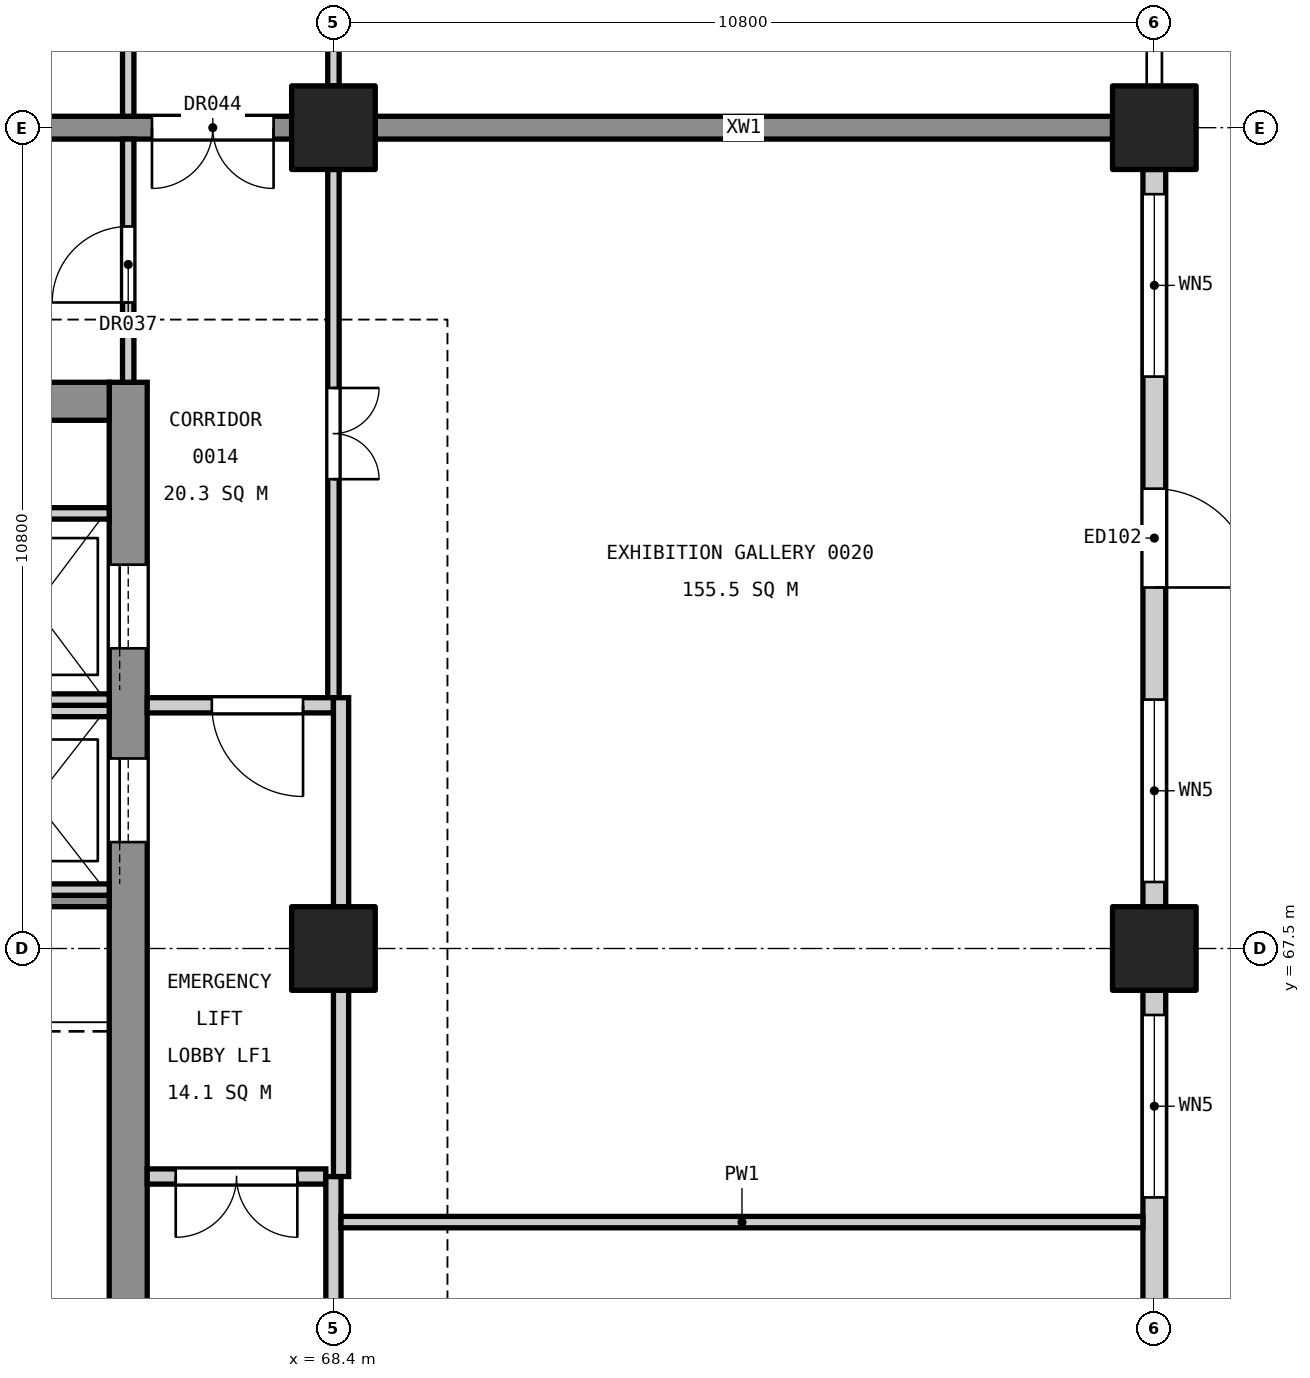
"""IFC4 building model, lengths in metres.
Left out: names, types, materials, properties, quantities, classifications, styles, units other than length and angle.
Written with IfcOpenShell. Run it as: python <this file> out.ifc"""

import sys

from ifc_helpers import new_model, si_unit, direction, frame, frame_2d, origin, origin_2d, place, context, subcontext, project, spatial, rectangle, extrude, element, fill, save


model = new_model("IFC4")
c1 = context("Model", 3, precision=1e-05, world=origin(), true_north=direction((0.0, 1.0)))
c2 = subcontext(c1, "Body", "Model", "MODEL_VIEW")
j1 = project(units=[si_unit("LENGTHUNIT", "METRE"), si_unit("PLANEANGLEUNIT", "RADIAN")], contexts=[c1])
p1 = place(None, origin())
s1 = spatial("IfcSite", under=j1, at=p1, CompositionType="ELEMENT")
p2 = place(p1, origin())
s2 = spatial("IfcBuilding", under=s1, at=p2, CompositionType="ELEMENT")
p3 = place(p2, origin())
s3 = spatial("IfcBuildingStorey", under=s2, at=p3, CompositionType="ELEMENT", Elevation=0.0)
for number, where, z_axis, x_axis in (
    (1, (68.4, 67.5, 0.0), (0.0, 0.0, 1.0), (1.0, 0.0, 0.0)),
    (2, (68.4, 78.3, 0.0), (0.0, 0.0, 1.0), (1.0, 0.0, 0.0)),
    (3, (79.2, 67.5, 0.0), (0.0, 0.0, 1.0), (1.0, 0.0, 0.0)),
    (4, (79.2, 78.3, 0.0), (0.0, 0.0, 1.0), (1.0, 0.0, 0.0)),
):
    element("IfcColumn", number, at=place(p3, frame(where, z_axis=z_axis, x_axis=x_axis)), inside=s3, PredefinedType="COLUMN", context=c2, shape_type="SweptSolid", body=[
        extrude(rectangle(XDim=1.1, YDim=1.1, at=origin_2d()), origin(), (0.0, 0.0, 1.0), 6.0),
    ])
p4 = place(p3, frame((65.7, 60.05, 0.0), z_axis=(0.0, 0.0, 1.0), x_axis=(0.0, 1.0, 0.0)))
e5 = element("IfcWall", 5, at=p4, inside=s3, PredefinedType="SHEAR", context=c2, shape_type="SweptSolid", body=[
    extrude(rectangle(XDim=14.9, YDim=0.5, at=frame_2d((7.45, 0.0))), origin(), (0.0, 0.0, 1.0), 5.7),
])
p5 = place(p4, frame((0.55, 0.0, 0.0)))
e6 = element("IfcOpeningElement", 6, at=p5, cuts=e5, PredefinedType="OPENING", context=c2, shape_type="SweptSolid", body=[
    extrude(rectangle(XDim=1.4, YDim=2.1, at=frame_2d((0.7, 1.05))), frame((0.0, 0.26, 0.0), z_axis=(0.0, -1.0, 0.0), x_axis=(1.0, 0.0, 0.0)), (0.0, 0.0, 1.0), 0.52),
])
p6 = place(p4, frame((8.85, 0.0, 0.0)))
e7 = element("IfcOpeningElement", 7, at=p6, cuts=e5, PredefinedType="OPENING", context=c2, shape_type="SweptSolid", body=[
    extrude(rectangle(XDim=1.1, YDim=2.1, at=frame_2d((0.55, 1.05))), frame((0.0, 0.26, 0.0), z_axis=(0.0, -1.0, 0.0), x_axis=(1.0, 0.0, 0.0)), (0.0, 0.0, 1.0), 0.52),
])
p7 = place(p4, frame((11.4, 0.0, 0.0)))
e8 = element("IfcOpeningElement", 8, at=p7, cuts=e5, PredefinedType="OPENING", context=c2, shape_type="SweptSolid", body=[
    extrude(rectangle(XDim=1.1, YDim=2.1, at=frame_2d((0.55, 1.05))), frame((0.0, 0.26, 0.0), z_axis=(0.0, -1.0, 0.0), x_axis=(1.0, 0.0, 0.0)), (0.0, 0.0, 1.0), 0.52),
])
p8 = place(p3, frame((61.45, 74.7, 0.0), z_axis=(0.0, 0.0, 1.0), x_axis=(1.0, 0.0, 0.0)))
e9 = element("IfcWall", 9, at=p8, inside=s3, PredefinedType="SHEAR", context=c2, shape_type="SweptSolid", body=[
    extrude(rectangle(XDim=4.0, YDim=0.5, at=frame_2d((2.0, 0.0))), origin(), (0.0, 0.0, 1.0), 5.7),
])
p9 = place(p3, frame((61.75, 78.3, 0.0), z_axis=(0.0, 0.0, 1.0), x_axis=(1.0, 0.0, 0.0)))
e10 = element("IfcWall", 10, at=p9, inside=s3, PredefinedType="SHEAR", context=c2, shape_type="SweptSolid", body=[
    extrude(rectangle(XDim=6.1, YDim=0.3, at=frame_2d((3.05, 0.0))), origin(), (0.0, 0.0, 1.0), 5.7),
])
p10 = place(p9, frame((4.262, 0.0, 0.0)))
e11 = element("IfcOpeningElement", 11, at=p10, cuts=e10, PredefinedType="OPENING", context=c2, shape_type="SweptSolid", body=[
    extrude(rectangle(XDim=1.6, YDim=2.1, at=frame_2d((0.8, 1.05))), frame((0.0, 0.16, 0.0), z_axis=(0.0, -1.0, 0.0), x_axis=(1.0, 0.0, 0.0)), (0.0, 0.0, 1.0), 0.32),
])
p11 = place(p3, frame((68.95, 78.3, 0.0), z_axis=(0.0, 0.0, 1.0), x_axis=(1.0, 0.0, 0.0)))
e12 = element("IfcWall", 12, at=p11, inside=s3, PredefinedType="SHEAR", context=c2, shape_type="SweptSolid", body=[
    extrude(rectangle(XDim=9.7, YDim=0.3, at=frame_2d((4.85, 0.0))), origin(), (0.0, 0.0, 1.0), 5.7),
])
p12 = place(p3, frame((61.45, 68.125, 0.0), z_axis=(0.0, 0.0, 1.0), x_axis=(1.0, 0.0, 0.0)))
e13 = element("IfcWall", 13, at=p12, inside=s3, PredefinedType="SOLIDWALL", context=c2, shape_type="SweptSolid", body=[
    extrude(rectangle(XDim=4.0, YDim=0.15, at=frame_2d((2.0, 0.0))), origin(), (0.0, 0.0, 1.0), 5.7),
])
for number, where, z_axis, x_axis in (
    (14, (63.65, 68.275, 0.0), (0.0, 0.0, 1.0), (1.0, 0.0, 0.0)),
    (15, (63.65, 70.625, 0.0), (0.0, 0.0, 1.0), (1.0, 0.0, 0.0)),
    (16, (63.65, 70.775, 0.0), (0.0, 0.0, 1.0), (1.0, 0.0, 0.0)),
    (17, (63.65, 73.225, 0.0), (0.0, 0.0, 1.0), (1.0, 0.0, 0.0)),
):
    element("IfcWall", number, at=place(p3, frame(where, z_axis=z_axis, x_axis=x_axis)), inside=s3, PredefinedType="SOLIDWALL", context=c2, shape_type="SweptSolid", body=[
        extrude(rectangle(XDim=1.8, YDim=0.15, at=frame_2d((0.9, 0.0))), origin(), (0.0, 0.0, 1.0), 6.0),
    ])
p13 = place(p3, frame((79.2, 57.25, 0.0), z_axis=(0.0, 0.0, 1.0), x_axis=(0.0, 1.0, 0.0)))
e18 = element("IfcWall", 18, at=p13, inside=s3, PredefinedType="STANDARD", context=c2, shape_type="SweptSolid", body=[
    extrude(rectangle(XDim=9.7, YDim=0.3, at=frame_2d((4.85, 0.0))), origin(), (0.0, 0.0, 1.0), 4.6),
])
p14 = place(p13, frame((0.325, 0.0, 0.9)))
e19 = element("IfcOpeningElement", 19, at=p14, cuts=e18, PredefinedType="OPENING", context=c2, shape_type="SweptSolid", body=[
    extrude(rectangle(XDim=2.4, YDim=3.0, at=frame_2d((1.2, 1.5))), frame((0.0, 0.16, 0.0), z_axis=(0.0, -1.0, 0.0), x_axis=(1.0, 0.0, 0.0)), (0.0, 0.0, 1.0), 0.32),
])
p15 = place(p13, frame((6.975, 0.0, 0.9)))
e20 = element("IfcOpeningElement", 20, at=p15, cuts=e18, PredefinedType="OPENING", context=c2, shape_type="SweptSolid", body=[
    extrude(rectangle(XDim=2.4, YDim=3.0, at=frame_2d((1.2, 1.5))), frame((0.0, 0.16, 0.0), z_axis=(0.0, -1.0, 0.0), x_axis=(1.0, 0.0, 0.0)), (0.0, 0.0, 1.0), 0.32),
])
p16 = place(p13, frame((4.2, 0.0, 0.0)))
e21 = element("IfcOpeningElement", 21, at=p16, cuts=e18, PredefinedType="OPENING", context=c2, shape_type="SweptSolid", body=[
    extrude(rectangle(XDim=1.3, YDim=2.4, at=frame_2d((0.65, 1.2))), frame((0.0, 0.16, 0.0), z_axis=(0.0, -1.0, 0.0), x_axis=(1.0, 0.0, 0.0)), (0.0, 0.0, 1.0), 0.32),
])
p17 = place(p3, frame((79.2, 68.05, 0.0), z_axis=(0.0, 0.0, 1.0), x_axis=(0.0, 1.0, 0.0)))
e22 = element("IfcWall", 22, at=p17, inside=s3, PredefinedType="STANDARD", context=c2, shape_type="SweptSolid", body=[
    extrude(rectangle(XDim=9.7, YDim=0.3, at=frame_2d((4.85, 0.0))), origin(), (0.0, 0.0, 1.0), 4.6),
])
p18 = place(p17, frame((0.325, 0.0, 0.9)))
e23 = element("IfcOpeningElement", 23, at=p18, cuts=e22, PredefinedType="OPENING", context=c2, shape_type="SweptSolid", body=[
    extrude(rectangle(XDim=2.4, YDim=3.0, at=frame_2d((1.2, 1.5))), frame((0.0, 0.16, 0.0), z_axis=(0.0, -1.0, 0.0), x_axis=(1.0, 0.0, 0.0)), (0.0, 0.0, 1.0), 0.32),
])
p19 = place(p17, frame((6.975, 0.0, 0.9)))
e24 = element("IfcOpeningElement", 24, at=p19, cuts=e22, PredefinedType="OPENING", context=c2, shape_type="SweptSolid", body=[
    extrude(rectangle(XDim=2.4, YDim=3.0, at=frame_2d((1.2, 1.5))), frame((0.0, 0.16, 0.0), z_axis=(0.0, -1.0, 0.0), x_axis=(1.0, 0.0, 0.0)), (0.0, 0.0, 1.0), 0.32),
])
p20 = place(p17, frame((4.2, 0.0, 0.0)))
e25 = element("IfcOpeningElement", 25, at=p20, cuts=e22, PredefinedType="OPENING", context=c2, shape_type="SweptSolid", body=[
    extrude(rectangle(XDim=1.3, YDim=2.4, at=frame_2d((0.65, 1.2))), frame((0.0, 0.16, 0.0), z_axis=(0.0, -1.0, 0.0), x_axis=(1.0, 0.0, 0.0)), (0.0, 0.0, 1.0), 0.32),
])
p21 = place(p3, frame((65.7, 74.95, 0.0), z_axis=(0.0, 0.0, 1.0), x_axis=(0.0, 1.0, 0.0)))
e26 = element("IfcWall", 26, at=p21, inside=s3, PredefinedType="PARTITIONING", context=c2, shape_type="SweptSolid", body=[
    extrude(rectangle(XDim=3.2, YDim=0.15, at=frame_2d((1.6, 0.0))), origin(), (0.0, 0.0, 1.0), 4.6),
])
p22 = place(p21, frame((1.05, 0.0, 0.0)))
e27 = element("IfcOpeningElement", 27, at=p22, cuts=e26, PredefinedType="OPENING", context=c2, shape_type="SweptSolid", body=[
    extrude(rectangle(XDim=1.0, YDim=2.1, at=frame_2d((0.5, 1.05))), frame((0.0, 0.085, 0.0), z_axis=(0.0, -1.0, 0.0), x_axis=(1.0, 0.0, 0.0)), (0.0, 0.0, 1.0), 0.17),
])
p23 = place(p3, frame((65.7, 78.45, 0.0), z_axis=(0.0, 0.0, 1.0), x_axis=(0.0, 1.0, 0.0)))
e28 = element("IfcWall", 28, at=p23, inside=s3, PredefinedType="PARTITIONING", context=c2, shape_type="SweptSolid", body=[
    extrude(rectangle(XDim=10.4, YDim=0.15, at=frame_2d((5.2, 0.0))), origin(), (0.0, 0.0, 1.0), 4.6),
])
p24 = place(p23, frame((8.35, 0.0, 0.0)))
e29 = element("IfcOpeningElement", 29, at=p24, cuts=e28, PredefinedType="OPENING", context=c2, shape_type="SweptSolid", body=[
    extrude(rectangle(XDim=1.0, YDim=2.1, at=frame_2d((0.5, 1.05))), frame((0.0, 0.085, 0.0), z_axis=(0.0, -1.0, 0.0), x_axis=(1.0, 0.0, 0.0)), (0.0, 0.0, 1.0), 0.17),
])
p25 = place(p23, frame((4.75, 0.0, 0.0)))
e30 = element("IfcOpeningElement", 30, at=p25, cuts=e28, PredefinedType="OPENING", context=c2, shape_type="SweptSolid", body=[
    extrude(rectangle(XDim=1.0, YDim=2.1, at=frame_2d((0.5, 1.05))), frame((0.0, 0.085, 0.0), z_axis=(0.0, -1.0, 0.0), x_axis=(1.0, 0.0, 0.0)), (0.0, 0.0, 1.0), 0.17),
])
p26 = place(p23, frame((1.15, 0.0, 0.0)))
e31 = element("IfcOpeningElement", 31, at=p26, cuts=e28, PredefinedType="OPENING", context=c2, shape_type="SweptSolid", body=[
    extrude(rectangle(XDim=1.0, YDim=2.1, at=frame_2d((0.5, 1.05))), frame((0.0, 0.085, 0.0), z_axis=(0.0, -1.0, 0.0), x_axis=(1.0, 0.0, 0.0)), (0.0, 0.0, 1.0), 0.17),
])
p27 = place(p3, frame((65.95, 64.5, 0.0), z_axis=(0.0, 0.0, 1.0), x_axis=(1.0, 0.0, 0.0)))
e32 = element("IfcWall", 32, at=p27, inside=s3, PredefinedType="PARTITIONING", context=c2, shape_type="SweptSolid", body=[
    extrude(rectangle(XDim=2.35, YDim=0.2, at=frame_2d((1.175, 0.0))), origin(), (0.0, 0.0, 1.0), 4.6),
])
p28 = place(p27, frame((0.375, 0.0, 0.0)))
e33 = element("IfcOpeningElement", 33, at=p28, cuts=e32, PredefinedType="OPENING", context=c2, shape_type="SweptSolid", body=[
    extrude(rectangle(XDim=1.6, YDim=2.1, at=frame_2d((0.8, 1.05))), frame((0.0, 0.11, 0.0), z_axis=(0.0, -1.0, 0.0), x_axis=(1.0, 0.0, 0.0)), (0.0, 0.0, 1.0), 0.22),
])
p29 = place(p3, frame((68.4, 60.3, 0.0), z_axis=(0.0, 0.0, 1.0), x_axis=(0.0, 1.0, 0.0)))
e34 = element("IfcWall", 34, at=p29, inside=s3, PredefinedType="PARTITIONING", context=c2, shape_type="SweptSolid", body=[
    extrude(rectangle(XDim=4.2, YDim=0.2, at=frame_2d((2.1, 0.0))), origin(), (0.0, 0.0, 1.0), 4.6),
])
p30 = place(p3, frame((68.4, 70.8, 0.0), z_axis=(0.0, 0.0, 1.0), x_axis=(0.0, 1.0, 0.0)))
e35 = element("IfcWall", 35, at=p30, inside=s3, PredefinedType="PARTITIONING", context=c2, shape_type="SweptSolid", body=[
    extrude(rectangle(XDim=6.95, YDim=0.15, at=frame_2d((3.475, 0.0))), origin(), (0.0, 0.0, 1.0), 4.6),
])
p31 = place(p30, frame((2.875, 0.0, 0.0)))
e36 = element("IfcOpeningElement", 36, at=p31, cuts=e35, PredefinedType="OPENING", context=c2, shape_type="SweptSolid", body=[
    extrude(rectangle(XDim=1.2, YDim=2.1, at=frame_2d((0.6, 1.05))), frame((0.0, 0.085, 0.0), z_axis=(0.0, -1.0, 0.0), x_axis=(1.0, 0.0, 0.0)), (0.0, 0.0, 1.0), 0.17),
])
p32 = place(p3, frame((68.4, 78.85, 0.0), z_axis=(0.0, 0.0, 1.0), x_axis=(0.0, 1.0, 0.0)))
e37 = element("IfcWall", 37, at=p32, inside=s3, PredefinedType="PARTITIONING", context=c2, shape_type="SweptSolid", body=[
    extrude(rectangle(XDim=9.7, YDim=0.15, at=frame_2d((4.85, 0.0))), origin(), (0.0, 0.0, 1.0), 4.6),
])
p33 = place(p32, frame((0.925, 0.0, 0.0)))
e38 = element("IfcOpeningElement", 38, at=p33, cuts=e37, PredefinedType="OPENING", context=c2, shape_type="SweptSolid", body=[
    extrude(rectangle(XDim=1.2, YDim=2.1, at=frame_2d((0.6, 1.05))), frame((0.0, 0.085, 0.0), z_axis=(0.0, -1.0, 0.0), x_axis=(1.0, 0.0, 0.0)), (0.0, 0.0, 1.0), 0.17),
])
p34 = place(p32, frame((7.575, 0.0, 0.0)))
e39 = element("IfcOpeningElement", 39, at=p34, cuts=e37, PredefinedType="OPENING", context=c2, shape_type="SweptSolid", body=[
    extrude(rectangle(XDim=1.2, YDim=2.1, at=frame_2d((0.6, 1.05))), frame((0.0, 0.085, 0.0), z_axis=(0.0, -1.0, 0.0), x_axis=(1.0, 0.0, 0.0)), (0.0, 0.0, 1.0), 0.17),
])
p35 = place(p32, frame((4.25, 0.0, 0.0)))
e40 = element("IfcOpeningElement", 40, at=p35, cuts=e37, PredefinedType="OPENING", context=c2, shape_type="SweptSolid", body=[
    extrude(rectangle(XDim=1.2, YDim=2.1, at=frame_2d((0.6, 1.05))), frame((0.0, 0.085, 0.0), z_axis=(0.0, -1.0, 0.0), x_axis=(1.0, 0.0, 0.0)), (0.0, 0.0, 1.0), 0.17),
])
p36 = place(p3, frame((65.95, 70.7, 0.0), z_axis=(0.0, 0.0, 1.0), x_axis=(1.0, 0.0, 0.0)))
e41 = element("IfcWall", 41, at=p36, inside=s3, PredefinedType="PARTITIONING", context=c2, shape_type="SweptSolid", body=[
    extrude(rectangle(XDim=2.45, YDim=0.2, at=frame_2d((1.225, 0.0))), origin(), (0.0, 0.0, 1.0), 4.6),
])
p37 = place(p36, frame((0.85, 0.0, 0.0)))
e42 = element("IfcOpeningElement", 42, at=p37, cuts=e41, PredefinedType="OPENING", context=c2, shape_type="SweptSolid", body=[
    extrude(rectangle(XDim=1.2, YDim=2.1, at=frame_2d((0.6, 1.05))), frame((0.0, 0.11, 0.0), z_axis=(0.0, -1.0, 0.0), x_axis=(1.0, 0.0, 0.0)), (0.0, 0.0, 1.0), 0.22),
])
p38 = place(p3, frame((68.5, 64.5, 0.0), z_axis=(0.0, 0.0, 1.0), x_axis=(0.0, 1.0, 0.0)))
e43 = element("IfcWall", 43, at=p38, inside=s3, PredefinedType="PARTITIONING", context=c2, shape_type="SweptSolid", body=[
    extrude(rectangle(XDim=2.45, YDim=0.2, at=frame_2d((1.225, 0.0))), origin(), (0.0, 0.0, 1.0), 4.6),
])
p39 = place(p3, frame((68.5, 68.05, 0.0), z_axis=(0.0, 0.0, 1.0), x_axis=(0.0, 1.0, 0.0)))
e44 = element("IfcWall", 44, at=p39, inside=s3, PredefinedType="PARTITIONING", context=c2, shape_type="SweptSolid", body=[
    extrude(rectangle(XDim=2.75, YDim=0.2, at=frame_2d((1.375, 0.0))), origin(), (0.0, 0.0, 1.0), 4.6),
])
p40 = place(p3, frame((68.5, 63.9, 0.0), z_axis=(0.0, 0.0, 1.0), x_axis=(1.0, 0.0, 0.0)))
e45 = element("IfcWall", 45, at=p40, inside=s3, PredefinedType="PARTITIONING", context=c2, shape_type="SweptSolid", body=[
    extrude(rectangle(XDim=10.55, YDim=0.15, at=frame_2d((5.275, 0.0))), origin(), (0.0, 0.0, 1.0), 4.9),
])
p41 = place(p6, origin())
e46 = element("IfcDoor", 46, at=p41, inside=s3, OperationType="SLIDING_TO_LEFT", PredefinedType="DOOR", context=c2, shape_type="SweptSolid", body=[
    extrude(rectangle(XDim=1.1, YDim=2.1, at=frame_2d((0.55, 1.05))), frame((0.0, 0.025, 0.0), z_axis=(0.0, -1.0, 0.0), x_axis=(1.0, 0.0, 0.0)), (0.0, 0.0, 1.0), 0.05),
])
fill(e7, e46)
p42 = place(p7, origin())
e47 = element("IfcDoor", 47, at=p42, inside=s3, OperationType="SLIDING_TO_LEFT", PredefinedType="DOOR", context=c2, shape_type="SweptSolid", body=[
    extrude(rectangle(XDim=1.1, YDim=2.1, at=frame_2d((0.55, 1.05))), frame((0.0, 0.025, 0.0), z_axis=(0.0, -1.0, 0.0), x_axis=(1.0, 0.0, 0.0)), (0.0, 0.0, 1.0), 0.05),
])
fill(e8, e47)
p43 = place(p15, origin())
e48 = element("IfcWindow", 48, at=p43, inside=s3, PartitioningType="SINGLE_PANEL", PredefinedType="WINDOW", context=c2, shape_type="SweptSolid", body=[
    extrude(rectangle(XDim=2.4, YDim=3.0, at=frame_2d((1.2, 1.5))), frame((0.0, 0.03, 0.0), z_axis=(0.0, -1.0, 0.0), x_axis=(1.0, 0.0, 0.0)), (0.0, 0.0, 1.0), 0.06),
])
fill(e20, e48)
p44 = place(p18, origin())
e49 = element("IfcWindow", 49, at=p44, inside=s3, PartitioningType="SINGLE_PANEL", PredefinedType="WINDOW", context=c2, shape_type="SweptSolid", body=[
    extrude(rectangle(XDim=2.4, YDim=3.0, at=frame_2d((1.2, 1.5))), frame((0.0, 0.03, 0.0), z_axis=(0.0, -1.0, 0.0), x_axis=(1.0, 0.0, 0.0)), (0.0, 0.0, 1.0), 0.06),
])
fill(e23, e49)
p45 = place(p19, origin())
e50 = element("IfcWindow", 50, at=p45, inside=s3, PartitioningType="SINGLE_PANEL", PredefinedType="WINDOW", context=c2, shape_type="SweptSolid", body=[
    extrude(rectangle(XDim=2.4, YDim=3.0, at=frame_2d((1.2, 1.5))), frame((0.0, 0.03, 0.0), z_axis=(0.0, -1.0, 0.0), x_axis=(1.0, 0.0, 0.0)), (0.0, 0.0, 1.0), 0.06),
])
fill(e24, e50)
p46 = place(p20, frame((1.3, 0.0, 0.0), z_axis=(0.0, 0.0, 1.0), x_axis=(-1.0, 0.0, 0.0)))
e51 = element("IfcDoor", 51, at=p46, inside=s3, OperationType="SINGLE_SWING_RIGHT", PredefinedType="DOOR", context=c2, shape_type="SweptSolid", body=[
    extrude(rectangle(XDim=1.3, YDim=2.4, at=frame_2d((0.65, 1.2))), frame((0.0, 0.025, 0.0), z_axis=(0.0, -1.0, 0.0), x_axis=(1.0, 0.0, 0.0)), (0.0, 0.0, 1.0), 0.05),
])
fill(e25, e51)
p47 = place(p31, frame((1.2, 0.0, 0.0), z_axis=(0.0, 0.0, 1.0), x_axis=(-1.0, 0.0, 0.0)))
e52 = element("IfcDoor", 52, at=p47, inside=s3, OperationType="DOUBLE_DOOR_SINGLE_SWING", PredefinedType="DOOR", context=c2, shape_type="SweptSolid", body=[
    extrude(rectangle(XDim=1.2, YDim=2.1, at=frame_2d((0.6, 1.05))), frame((0.0, 0.025, 0.0), z_axis=(0.0, -1.0, 0.0), x_axis=(1.0, 0.0, 0.0)), (0.0, 0.0, 1.0), 0.05),
])
fill(e36, e52)
p48 = place(p22, origin())
e53 = element("IfcDoor", 53, at=p48, inside=s3, OperationType="SINGLE_SWING_LEFT", PredefinedType="DOOR", context=c2, shape_type="SweptSolid", body=[
    extrude(rectangle(XDim=1.0, YDim=2.1, at=frame_2d((0.5, 1.05))), frame((0.0, 0.025, 0.0), z_axis=(0.0, -1.0, 0.0), x_axis=(1.0, 0.0, 0.0)), (0.0, 0.0, 1.0), 0.05),
])
fill(e27, e53)
p49 = place(p37, frame((1.2, 0.0, 0.0), z_axis=(0.0, 0.0, 1.0), x_axis=(-1.0, 0.0, 0.0)))
e54 = element("IfcDoor", 54, at=p49, inside=s3, OperationType="SINGLE_SWING_LEFT", PredefinedType="DOOR", context=c2, shape_type="SweptSolid", body=[
    extrude(rectangle(XDim=1.2, YDim=2.1, at=frame_2d((0.6, 1.05))), frame((0.0, 0.025, 0.0), z_axis=(0.0, -1.0, 0.0), x_axis=(1.0, 0.0, 0.0)), (0.0, 0.0, 1.0), 0.05),
])
fill(e42, e54)
p50 = place(p28, frame((1.6, 0.0, 0.0), z_axis=(0.0, 0.0, 1.0), x_axis=(-1.0, 0.0, 0.0)))
e55 = element("IfcDoor", 55, at=p50, inside=s3, OperationType="DOUBLE_DOOR_SINGLE_SWING", PredefinedType="DOOR", context=c2, shape_type="SweptSolid", body=[
    extrude(rectangle(XDim=1.6, YDim=2.1, at=frame_2d((0.8, 1.05))), frame((0.0, 0.025, 0.0), z_axis=(0.0, -1.0, 0.0), x_axis=(1.0, 0.0, 0.0)), (0.0, 0.0, 1.0), 0.05),
])
fill(e33, e55)
p51 = place(p10, frame((1.6, 0.0, 0.0), z_axis=(0.0, 0.0, 1.0), x_axis=(-1.0, 0.0, 0.0)))
e56 = element("IfcDoor", 56, at=p51, inside=s3, OperationType="DOUBLE_DOOR_SINGLE_SWING", PredefinedType="DOOR", context=c2, shape_type="SweptSolid", body=[
    extrude(rectangle(XDim=1.6, YDim=2.1, at=frame_2d((0.8, 1.05))), frame((0.0, 0.025, 0.0), z_axis=(0.0, -1.0, 0.0), x_axis=(1.0, 0.0, 0.0)), (0.0, 0.0, 1.0), 0.05),
])
fill(e11, e56)
save(model, sys.argv[1])
